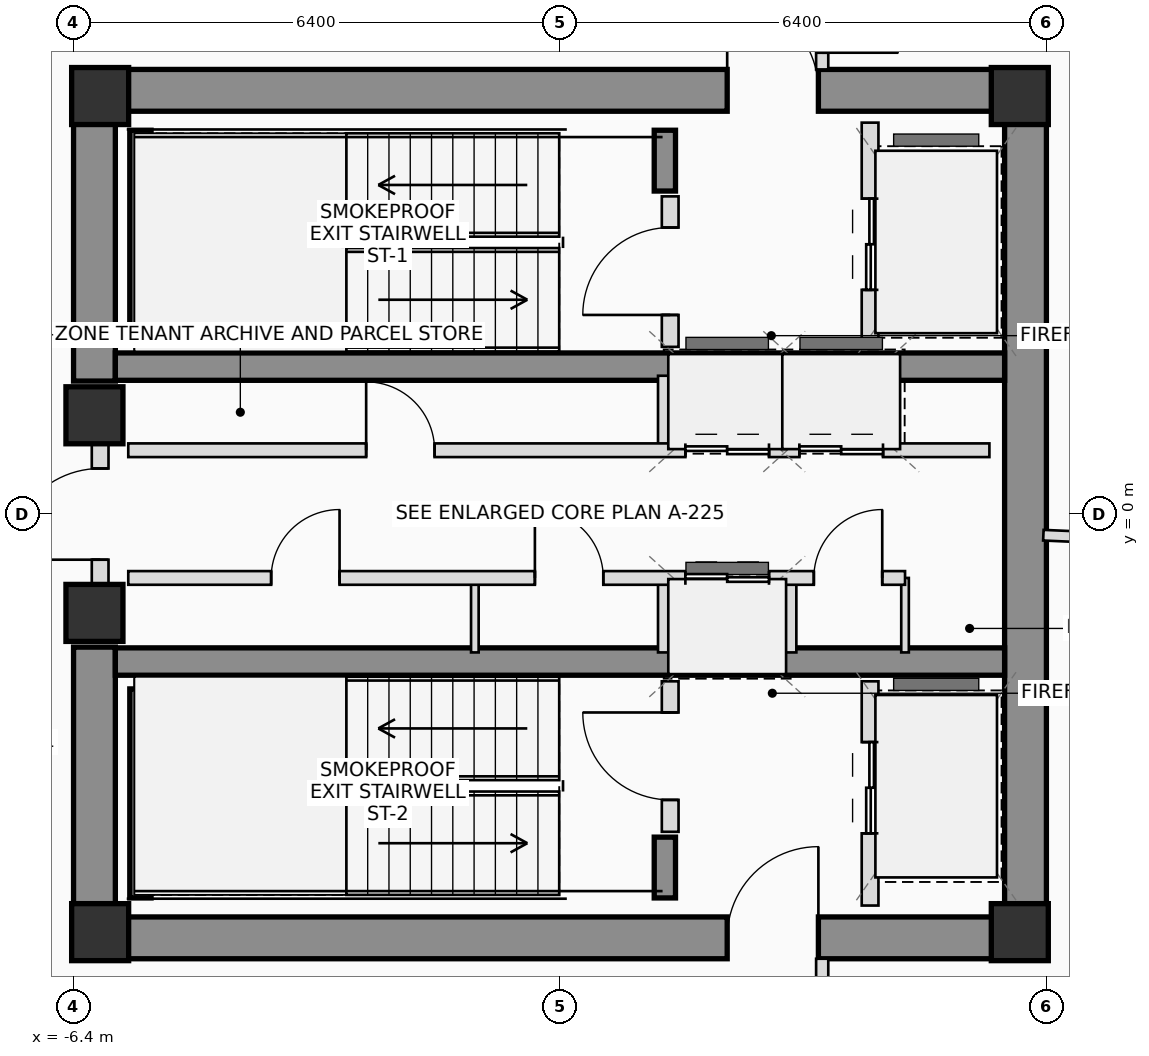
"""IFC4 building model, lengths in metres.
Left out: names, types, materials, properties, quantities, classifications, styles, units other than length and angle.
Written with IfcOpenShell. Run it as: python <this file> out.ifc"""

import sys

from ifc_helpers import new_model, si_unit, direction, frame, frame_2d, origin, origin_2d, place, context, subcontext, project, spatial, rectangle, extrude, source, transform, mapped, element, fill, save


model = new_model("IFC4")
c1 = context("Model", 3, precision=1e-05, world=origin(), true_north=direction((0.0, 1.0)))
c2 = subcontext(c1, "Body", "Model", "MODEL_VIEW")
j1 = project(units=[si_unit("LENGTHUNIT", "METRE"), si_unit("PLANEANGLEUNIT", "RADIAN")], contexts=[c1])
p1 = place(None, origin())
s1 = spatial("IfcSite", under=j1, at=p1, CompositionType="ELEMENT")
p2 = place(p1, origin())
s2 = spatial("IfcBuilding", under=s1, at=p2, CompositionType="ELEMENT")
p3 = place(p2, frame((0.0, 0.0, 271.15)))
s3 = spatial("IfcBuildingStorey", under=s2, at=p3, CompositionType="ELEMENT", Elevation=271.15)
m1 = source(origin(), c2, "Body", "SweptSolid", [
    extrude(rectangle(XDim=0.75, YDim=0.75, at=origin_2d()), origin(), (0.0, 0.0, 1.0), 3.4),
])
for number, where, z_axis, x_axis in (
    (1, (-6.05, -5.5, 0.0), (0.0, 0.0, 1.0), (1.0, 0.0, 0.0)),
    (2, (6.05, -5.5, 0.0), (0.0, 0.0, 1.0), (1.0, 0.0, 0.0)),
    (3, (6.05, 5.5, 0.0), (0.0, 0.0, 1.0), (1.0, 0.0, 0.0)),
    (4, (-6.05, 5.5, 0.0), (0.0, 0.0, 1.0), (1.0, 0.0, 0.0)),
):
    element("IfcColumn", number, at=place(p3, frame(where, z_axis=z_axis, x_axis=x_axis)), inside=s3, PredefinedType="COLUMN", context=c2, shape_type="MappedRepresentation", body=[
        mapped(m1, transform((0.0, 0.0, 0.0), scale=1.0)),
    ])
p4 = place(p3, frame((-6.4, 5.575, 0.0), z_axis=(0.0, 0.0, 1.0), x_axis=(1.0, 0.0, 0.0)))
e5 = element("IfcWall", 5, at=p4, inside=s3, PredefinedType="SHEAR", context=c2, shape_type="SweptSolid", body=[
    extrude(rectangle(XDim=12.8, YDim=0.55, at=frame_2d((6.4, 0.0))), origin(), (0.0, 0.0, 1.0), 3.4),
])
p5 = place(p4, frame((8.6, 0.0, 0.0)))
e6 = element("IfcOpeningElement", 6, at=p5, cuts=e5, PredefinedType="OPENING", context=c2, shape_type="SweptSolid", body=[
    extrude(rectangle(XDim=1.2, YDim=2.2, at=frame_2d((0.6, 1.1))), frame((0.0, 0.285, 0.0), z_axis=(0.0, -1.0, 0.0), x_axis=(1.0, 0.0, 0.0)), (0.0, 0.0, 1.0), 0.57),
])
p6 = place(p3, frame((-6.4, -5.575, 0.0), z_axis=(0.0, 0.0, 1.0), x_axis=(1.0, 0.0, 0.0)))
e7 = element("IfcWall", 7, at=p6, inside=s3, PredefinedType="SHEAR", context=c2, shape_type="SweptSolid", body=[
    extrude(rectangle(XDim=12.8, YDim=0.55, at=frame_2d((6.4, 0.0))), origin(), (0.0, 0.0, 1.0), 3.4),
])
p7 = place(p6, frame((8.6, 0.0, 0.0)))
e8 = element("IfcOpeningElement", 8, at=p7, cuts=e7, PredefinedType="OPENING", context=c2, shape_type="SweptSolid", body=[
    extrude(rectangle(XDim=1.2, YDim=2.2, at=frame_2d((0.6, 1.1))), frame((0.0, 0.285, 0.0), z_axis=(0.0, -1.0, 0.0), x_axis=(1.0, 0.0, 0.0)), (0.0, 0.0, 1.0), 0.57),
])
p8 = place(p3, frame((6.125, -5.3, 0.0), z_axis=(0.0, 0.0, 1.0), x_axis=(0.0, 1.0, 0.0)))
e9 = element("IfcWall", 9, at=p8, inside=s3, PredefinedType="SHEAR", context=c2, shape_type="SweptSolid", body=[
    extrude(rectangle(XDim=10.6, YDim=0.55, at=frame_2d((5.3, 0.0))), origin(), (0.0, 0.0, 1.0), 3.4),
])
for number, where, z_axis, x_axis in (
    (10, (-6.125, -5.3, 0.0), (0.0, 0.0, 1.0), (0.0, 1.0, 0.0)),
    (11, (-6.125, 1.75, 0.0), (0.0, 0.0, 1.0), (0.0, 1.0, 0.0)),
):
    element("IfcWall", number, at=place(p3, frame(where, z_axis=z_axis, x_axis=x_axis)), inside=s3, PredefinedType="SHEAR", context=c2, shape_type="SweptSolid", body=[
        extrude(rectangle(XDim=3.55, YDim=0.55, at=frame_2d((1.775, 0.0))), origin(), (0.0, 0.0, 1.0), 3.4),
    ])
for number, where, z_axis, x_axis in (
    (12, (-5.85, 1.94, 0.0), (0.0, 0.0, 1.0), (1.0, 0.0, 0.0)),
    (13, (-5.85, -1.94, 0.0), (0.0, 0.0, 1.0), (1.0, 0.0, 0.0)),
):
    element("IfcWall", number, at=place(p3, frame(where, z_axis=z_axis, x_axis=x_axis)), inside=s3, PredefinedType="SHEAR", context=c2, shape_type="SweptSolid", body=[
        extrude(rectangle(XDim=11.7, YDim=0.36, at=frame_2d((5.85, 0.0))), origin(), (0.0, 0.0, 1.0), 3.4),
    ])
p9 = place(p3, frame((-5.52, 2.3, 0.0), z_axis=(0.0, 0.0, 1.0), x_axis=(0.0, 1.0, 0.0)))
e14 = element("IfcWall", 14, at=p9, inside=s3, PredefinedType="SHEAR", context=c2, shape_type="SweptSolid", body=[
    extrude(rectangle(XDim=2.75, YDim=0.28, at=frame_2d((1.375, 0.0))), origin(), (0.0, 0.0, 1.0), 3.4),
])
p10 = place(p3, frame((1.38, 4.25, 0.0), z_axis=(0.0, 0.0, 1.0), x_axis=(0.0, 1.0, 0.0)))
e15 = element("IfcWall", 15, at=p10, inside=s3, PredefinedType="SHEAR", context=c2, shape_type="SweptSolid", body=[
    extrude(rectangle(XDim=0.8, YDim=0.28, at=frame_2d((0.4, 0.0))), origin(), (0.0, 0.0, 1.0), 3.4),
])
p11 = place(p3, frame((-5.52, -5.05, 0.0), z_axis=(0.0, 0.0, 1.0), x_axis=(0.0, 1.0, 0.0)))
e16 = element("IfcWall", 16, at=p11, inside=s3, PredefinedType="SHEAR", context=c2, shape_type="SweptSolid", body=[
    extrude(rectangle(XDim=2.75, YDim=0.28, at=frame_2d((1.375, 0.0))), origin(), (0.0, 0.0, 1.0), 3.4),
])
p12 = place(p3, frame((1.38, -5.05, 0.0), z_axis=(0.0, 0.0, 1.0), x_axis=(0.0, 1.0, 0.0)))
e17 = element("IfcWall", 17, at=p12, inside=s3, PredefinedType="SHEAR", context=c2, shape_type="SweptSolid", body=[
    extrude(rectangle(XDim=0.8, YDim=0.28, at=frame_2d((0.4, 0.0))), origin(), (0.0, 0.0, 1.0), 3.4),
])
for number, where, z_axis, x_axis in (
    (18, (-6.125, -1.3, 0.0), (0.0, 0.0, 1.0), (1.0, 0.0, 0.0)),
    (19, (-6.125, 1.3, 0.0), (0.0, 0.0, 1.0), (1.0, 0.0, 0.0)),
):
    element("IfcColumn", number, at=place(p3, frame(where, z_axis=z_axis, x_axis=x_axis)), inside=s3, PredefinedType="COLUMN", context=c2, shape_type="MappedRepresentation", body=[
        mapped(m1, transform((0.0, 0.0, 0.0), scale=1.0)),
    ])
p13 = place(p3, frame((-6.05, -0.95, 0.0), z_axis=(0.0, 0.0, 1.0), x_axis=(0.0, 1.0, 0.0)))
e20 = element("IfcWall", 20, at=p13, inside=s3, PredefinedType="PLUMBINGWALL", context=c2, shape_type="SweptSolid", body=[
    extrude(rectangle(XDim=1.9, YDim=0.22, at=frame_2d((0.95, 0.0))), origin(), (0.0, 0.0, 1.0), 2.18),
])
p14 = place(p13, frame((0.35, 0.0, 0.0)))
e21 = element("IfcOpeningElement", 21, at=p14, cuts=e20, PredefinedType="OPENING", context=c2, shape_type="SweptSolid", body=[
    extrude(rectangle(XDim=1.2, YDim=2.2, at=frame_2d((0.6, 1.1))), frame((0.0, 0.12, 0.0), z_axis=(0.0, -1.0, 0.0), x_axis=(1.0, 0.0, 0.0)), (0.0, 0.0, 1.0), 0.24),
])
p15 = place(p3, frame((1.45, 2.2, 0.0), z_axis=(0.0, 0.0, 1.0), x_axis=(0.0, 1.0, 0.0)))
e22 = element("IfcWall", 22, at=p15, inside=s3, PredefinedType="PLUMBINGWALL", context=c2, shape_type="SweptSolid", body=[
    extrude(rectangle(XDim=1.98, YDim=0.22, at=frame_2d((0.99, 0.0))), origin(), (0.0, 0.0, 1.0), 3.2),
])
p16 = place(p15, frame((0.42, 0.0, 0.0)))
e23 = element("IfcOpeningElement", 23, at=p16, cuts=e22, PredefinedType="OPENING", context=c2, shape_type="SweptSolid", body=[
    extrude(rectangle(XDim=1.15, YDim=2.15, at=frame_2d((0.575, 1.075))), frame((0.0, 0.12, 0.0), z_axis=(0.0, -1.0, 0.0), x_axis=(1.0, 0.0, 0.0)), (0.0, 0.0, 1.0), 0.24),
])
p17 = place(p3, frame((4.08, 2.2, 0.0), z_axis=(0.0, 0.0, 1.0), x_axis=(0.0, 1.0, 0.0)))
e24 = element("IfcWall", 24, at=p17, inside=s3, PredefinedType="PLUMBINGWALL", context=c2, shape_type="SweptSolid", body=[
    extrude(rectangle(XDim=2.95, YDim=0.22, at=frame_2d((1.475, 0.0))), origin(), (0.0, 0.0, 1.0), 3.2),
])
p18 = place(p17, frame((0.75, 0.0, 0.0)))
e25 = element("IfcOpeningElement", 25, at=p18, cuts=e24, PredefinedType="OPENING", context=c2, shape_type="SweptSolid", body=[
    extrude(rectangle(XDim=1.2, YDim=2.25, at=frame_2d((0.6, 1.125))), frame((0.0, 0.12, 0.0), z_axis=(0.0, -1.0, 0.0), x_axis=(1.0, 0.0, 0.0)), (0.0, 0.0, 1.0), 0.24),
])
p19 = place(p3, frame((1.45, -4.18, 0.0), z_axis=(0.0, 0.0, 1.0), x_axis=(0.0, 1.0, 0.0)))
e26 = element("IfcWall", 26, at=p19, inside=s3, PredefinedType="PLUMBINGWALL", context=c2, shape_type="SweptSolid", body=[
    extrude(rectangle(XDim=1.98, YDim=0.22, at=frame_2d((0.99, 0.0))), origin(), (0.0, 0.0, 1.0), 3.2),
])
p20 = place(p19, frame((0.42, 0.0, 0.0)))
e27 = element("IfcOpeningElement", 27, at=p20, cuts=e26, PredefinedType="OPENING", context=c2, shape_type="SweptSolid", body=[
    extrude(rectangle(XDim=1.15, YDim=2.15, at=frame_2d((0.575, 1.075))), frame((0.0, 0.12, 0.0), z_axis=(0.0, -1.0, 0.0), x_axis=(1.0, 0.0, 0.0)), (0.0, 0.0, 1.0), 0.24),
])
p21 = place(p3, frame((4.08, -5.15, 0.0), z_axis=(0.0, 0.0, 1.0), x_axis=(0.0, 1.0, 0.0)))
e28 = element("IfcWall", 28, at=p21, inside=s3, PredefinedType="PLUMBINGWALL", context=c2, shape_type="SweptSolid", body=[
    extrude(rectangle(XDim=2.95, YDim=0.22, at=frame_2d((1.475, 0.0))), origin(), (0.0, 0.0, 1.0), 3.2),
])
p22 = place(p21, frame((0.95, 0.0, 0.0)))
e29 = element("IfcOpeningElement", 29, at=p22, cuts=e28, PredefinedType="OPENING", context=c2, shape_type="SweptSolid", body=[
    extrude(rectangle(XDim=1.2, YDim=2.25, at=frame_2d((0.6, 1.125))), frame((0.0, 0.12, 0.0), z_axis=(0.0, -1.0, 0.0), x_axis=(1.0, 0.0, 0.0)), (0.0, 0.0, 1.0), 0.24),
])
p23 = place(p3, frame((-1.12, -1.82, 0.0), z_axis=(0.0, 0.0, 1.0), x_axis=(0.0, 1.0, 0.0)))
e30 = element("IfcWall", 30, at=p23, inside=s3, PredefinedType="PARTITIONING", context=c2, shape_type="SweptSolid", body=[
    extrude(rectangle(XDim=0.98, YDim=0.1, at=frame_2d((0.49, 0.0))), origin(), (0.0, 0.0, 1.0), 3.2),
])
for number, where, z_axis, x_axis in (
    (31, (1.38, 0.84, 0.0), (0.0, 0.0, 1.0), (0.0, 1.0, 0.0)),
    (32, (1.38, -1.82, 0.0), (0.0, 0.0, 1.0), (0.0, 1.0, 0.0)),
    (33, (3.02, 0.84, 0.0), (0.0, 0.0, 1.0), (0.0, 1.0, 0.0)),
    (34, (4.38, 0.84, 0.0), (0.0, 0.0, 1.0), (0.0, 1.0, 0.0)),
    (35, (3.02, -1.82, 0.0), (0.0, 0.0, 1.0), (0.0, 1.0, 0.0)),
):
    element("IfcWall", number, at=place(p3, frame(where, z_axis=z_axis, x_axis=x_axis)), inside=s3, PredefinedType="PLUMBINGWALL", context=c2, shape_type="SweptSolid", body=[
        extrude(rectangle(XDim=0.98, YDim=0.18, at=frame_2d((0.49, 0.0))), origin(), (0.0, 0.0, 1.0), 3.2),
    ])
p24 = place(p3, frame((4.54, -1.82, 0.0), z_axis=(0.0, 0.0, 1.0), x_axis=(0.0, 1.0, 0.0)))
e36 = element("IfcWall", 36, at=p24, inside=s3, PredefinedType="PARTITIONING", context=c2, shape_type="SweptSolid", body=[
    extrude(rectangle(XDim=0.98, YDim=0.1, at=frame_2d((0.49, 0.0))), origin(), (0.0, 0.0, 1.0), 3.2),
])
p25 = place(p3, frame((-5.68, 0.84, 0.0), z_axis=(0.0, 0.0, 1.0), x_axis=(1.0, 0.0, 0.0)))
e37 = element("IfcWall", 37, at=p25, inside=s3, PredefinedType="PLUMBINGWALL", context=c2, shape_type="SweptSolid", body=[
    extrude(rectangle(XDim=11.33, YDim=0.18, at=frame_2d((5.665, 0.0))), origin(), (0.0, 0.0, 1.0), 3.2),
])
p26 = place(p25, frame((3.13, 0.0, 0.0)))
e38 = element("IfcOpeningElement", 38, at=p26, cuts=e37, PredefinedType="OPENING", context=c2, shape_type="SweptSolid", body=[
    extrude(rectangle(XDim=0.9, YDim=2.05, at=frame_2d((0.45, 1.025))), frame((0.0, 0.1, 0.0), z_axis=(0.0, -1.0, 0.0), x_axis=(1.0, 0.0, 0.0)), (0.0, 0.0, 1.0), 0.2),
])
p27 = place(p25, frame((7.33, 0.0, 0.0)))
e39 = element("IfcOpeningElement", 39, at=p27, cuts=e37, PredefinedType="OPENING", context=c2, shape_type="SweptSolid", body=[
    extrude(rectangle(XDim=1.1, YDim=2.2, at=frame_2d((0.55, 1.1))), frame((0.0, 0.1, 0.0), z_axis=(0.0, -1.0, 0.0), x_axis=(1.0, 0.0, 0.0)), (0.0, 0.0, 1.0), 0.2),
])
p28 = place(p25, frame((8.83, 0.0, 0.0)))
e40 = element("IfcOpeningElement", 40, at=p28, cuts=e37, PredefinedType="OPENING", context=c2, shape_type="SweptSolid", body=[
    extrude(rectangle(XDim=1.1, YDim=2.2, at=frame_2d((0.55, 1.1))), frame((0.0, 0.1, 0.0), z_axis=(0.0, -1.0, 0.0), x_axis=(1.0, 0.0, 0.0)), (0.0, 0.0, 1.0), 0.2),
])
p29 = place(p3, frame((-5.68, -0.84, 0.0), z_axis=(0.0, 0.0, 1.0), x_axis=(1.0, 0.0, 0.0)))
e41 = element("IfcWall", 41, at=p29, inside=s3, PredefinedType="PLUMBINGWALL", context=c2, shape_type="SweptSolid", body=[
    extrude(rectangle(XDim=10.22, YDim=0.18, at=frame_2d((5.11, 0.0))), origin(), (0.0, 0.0, 1.0), 3.2),
])
p30 = place(p29, frame((1.88, 0.0, 0.0)))
e42 = element("IfcOpeningElement", 42, at=p30, cuts=e41, PredefinedType="OPENING", context=c2, shape_type="SweptSolid", body=[
    extrude(rectangle(XDim=0.9, YDim=2.05, at=frame_2d((0.45, 1.025))), frame((0.0, 0.1, 0.0), z_axis=(0.0, -1.0, 0.0), x_axis=(1.0, 0.0, 0.0)), (0.0, 0.0, 1.0), 0.2),
])
p31 = place(p29, frame((5.35, 0.0, 0.0)))
e43 = element("IfcOpeningElement", 43, at=p31, cuts=e41, PredefinedType="OPENING", context=c2, shape_type="SweptSolid", body=[
    extrude(rectangle(XDim=0.9, YDim=2.05, at=frame_2d((0.45, 1.025))), frame((0.0, 0.1, 0.0), z_axis=(0.0, -1.0, 0.0), x_axis=(1.0, 0.0, 0.0)), (0.0, 0.0, 1.0), 0.2),
])
p32 = place(p29, frame((7.33, 0.0, 0.0)))
e44 = element("IfcOpeningElement", 44, at=p32, cuts=e41, PredefinedType="OPENING", context=c2, shape_type="SweptSolid", body=[
    extrude(rectangle(XDim=1.1, YDim=2.2, at=frame_2d((0.55, 1.1))), frame((0.0, 0.1, 0.0), z_axis=(0.0, -1.0, 0.0), x_axis=(1.0, 0.0, 0.0)), (0.0, 0.0, 1.0), 0.2),
])
p33 = place(p29, frame((9.02, 0.0, 0.0)))
e45 = element("IfcOpeningElement", 45, at=p33, cuts=e41, PredefinedType="OPENING", context=c2, shape_type="SweptSolid", body=[
    extrude(rectangle(XDim=0.9, YDim=2.05, at=frame_2d((0.45, 1.025))), frame((0.0, 0.1, 0.0), z_axis=(0.0, -1.0, 0.0), x_axis=(1.0, 0.0, 0.0)), (0.0, 0.0, 1.0), 0.2),
])
p34 = place(p3, frame((3.45, 7.49, 0.0), z_axis=(0.0, 0.0, 1.0), x_axis=(0.0, -1.0, 0.0)))
e46 = element("IfcWall", 46, at=p34, inside=s3, PredefinedType="PARTITIONING", context=c2, shape_type="SweptSolid", body=[
    extrude(rectangle(XDim=1.64, YDim=0.16, at=frame_2d((0.82, 0.0))), origin(), (0.0, 0.0, 1.0), 2.805),
])
p35 = place(p34, frame((0.42, 0.0, 0.0)))
e47 = element("IfcOpeningElement", 47, at=p35, cuts=e46, PredefinedType="OPENING", context=c2, shape_type="SweptSolid", body=[
    extrude(rectangle(XDim=1.0, YDim=2.25, at=frame_2d((0.5, 1.125))), frame((0.0, 0.09, 0.0), z_axis=(0.0, -1.0, 0.0), x_axis=(1.0, 0.0, 0.0)), (0.0, 0.0, 1.0), 0.18),
])
p36 = place(p3, frame((3.45, -5.85, 0.0), z_axis=(0.0, 0.0, 1.0), x_axis=(0.0, -1.0, 0.0)))
e48 = element("IfcWall", 48, at=p36, inside=s3, PredefinedType="PARTITIONING", context=c2, shape_type="SweptSolid", body=[
    extrude(rectangle(XDim=1.64, YDim=0.16, at=frame_2d((0.82, 0.0))), origin(), (0.0, 0.0, 1.0), 3.2),
])
p37 = place(p36, frame((0.32, 0.0, 0.0)))
e49 = element("IfcOpeningElement", 49, at=p37, cuts=e48, PredefinedType="OPENING", context=c2, shape_type="SweptSolid", body=[
    extrude(rectangle(XDim=1.0, YDim=2.25, at=frame_2d((0.5, 1.125))), frame((0.0, 0.09, 0.0), z_axis=(0.0, -1.0, 0.0), x_axis=(1.0, 0.0, 0.0)), (0.0, 0.0, 1.0), 0.18),
])
p38 = place(p3, frame((6.36, -0.278, 0.0), z_axis=(0.0, 0.0, 1.0), x_axis=(0.999047788643, -0.043629302162, 0.0)))
e50 = element("IfcWall", 50, at=p38, inside=s3, PredefinedType="PARTITIONING", context=c2, shape_type="SweptSolid", body=[
    extrude(rectangle(XDim=11.197, YDim=0.14, at=frame_2d((5.599, 0.0))), origin(), (0.0, 0.0, 1.0), 2.765),
])
p39 = place(p5, origin())
e51 = element("IfcDoor", 51, at=p39, inside=s3, OperationType="SINGLE_SWING_LEFT", PredefinedType="DOOR", context=c2, shape_type="SweptSolid", body=[
    extrude(rectangle(XDim=1.2, YDim=2.2, at=frame_2d((0.6, 1.1))), frame((0.0, 0.025, 0.0), z_axis=(0.0, -1.0, 0.0), x_axis=(1.0, 0.0, 0.0)), (0.0, 0.0, 1.0), 0.05),
])
fill(e6, e51)
p40 = place(p7, origin())
e52 = element("IfcDoor", 52, at=p40, inside=s3, OperationType="SINGLE_SWING_RIGHT", PredefinedType="DOOR", context=c2, shape_type="SweptSolid", body=[
    extrude(rectangle(XDim=1.2, YDim=2.2, at=frame_2d((0.6, 1.1))), frame((0.0, 0.025, 0.0), z_axis=(0.0, -1.0, 0.0), x_axis=(1.0, 0.0, 0.0)), (0.0, 0.0, 1.0), 0.05),
])
fill(e8, e52)
p41 = place(p14, origin())
e53 = element("IfcDoor", 53, at=p41, inside=s3, OperationType="SINGLE_SWING_LEFT", PredefinedType="DOOR", context=c2, shape_type="SweptSolid", body=[
    extrude(rectangle(XDim=1.2, YDim=2.2, at=frame_2d((0.6, 1.1))), frame((0.0, 0.025, 0.0), z_axis=(0.0, -1.0, 0.0), x_axis=(1.0, 0.0, 0.0)), (0.0, 0.0, 1.0), 0.05),
])
fill(e21, e53)
p42 = place(p16, origin())
e54 = element("IfcDoor", 54, at=p42, inside=s3, OperationType="SINGLE_SWING_LEFT", PredefinedType="DOOR", context=c2, shape_type="SweptSolid", body=[
    extrude(rectangle(XDim=1.15, YDim=2.15, at=frame_2d((0.575, 1.075))), frame((0.0, 0.025, 0.0), z_axis=(0.0, -1.0, 0.0), x_axis=(1.0, 0.0, 0.0)), (0.0, 0.0, 1.0), 0.05),
])
fill(e23, e54)
p43 = place(p18, origin())
e55 = element("IfcDoor", 55, at=p43, inside=s3, OperationType="DOUBLE_DOOR_SLIDING", PredefinedType="DOOR", context=c2, shape_type="SweptSolid", body=[
    extrude(rectangle(XDim=1.2, YDim=2.25, at=frame_2d((0.6, 1.125))), frame((0.0, 0.025, 0.0), z_axis=(0.0, -1.0, 0.0), x_axis=(1.0, 0.0, 0.0)), (0.0, 0.0, 1.0), 0.05),
])
fill(e25, e55)
p44 = place(p20, origin())
e56 = element("IfcDoor", 56, at=p44, inside=s3, OperationType="SINGLE_SWING_RIGHT", PredefinedType="DOOR", context=c2, shape_type="SweptSolid", body=[
    extrude(rectangle(XDim=1.15, YDim=2.15, at=frame_2d((0.575, 1.075))), frame((0.0, 0.025, 0.0), z_axis=(0.0, -1.0, 0.0), x_axis=(1.0, 0.0, 0.0)), (0.0, 0.0, 1.0), 0.05),
])
fill(e27, e56)
p45 = place(p22, origin())
e57 = element("IfcDoor", 57, at=p45, inside=s3, OperationType="DOUBLE_DOOR_SLIDING", PredefinedType="DOOR", context=c2, shape_type="SweptSolid", body=[
    extrude(rectangle(XDim=1.2, YDim=2.25, at=frame_2d((0.6, 1.125))), frame((0.0, 0.025, 0.0), z_axis=(0.0, -1.0, 0.0), x_axis=(1.0, 0.0, 0.0)), (0.0, 0.0, 1.0), 0.05),
])
fill(e29, e57)
p46 = place(p26, origin())
e58 = element("IfcDoor", 58, at=p46, inside=s3, OperationType="SINGLE_SWING_LEFT", PredefinedType="DOOR", context=c2, shape_type="SweptSolid", body=[
    extrude(rectangle(XDim=0.9, YDim=2.05, at=frame_2d((0.45, 1.025))), frame((0.0, 0.025, 0.0), z_axis=(0.0, -1.0, 0.0), x_axis=(1.0, 0.0, 0.0)), (0.0, 0.0, 1.0), 0.05),
])
fill(e38, e58)
p47 = place(p27, origin())
e59 = element("IfcDoor", 59, at=p47, inside=s3, OperationType="DOUBLE_DOOR_SLIDING", PredefinedType="DOOR", context=c2, shape_type="SweptSolid", body=[
    extrude(rectangle(XDim=1.1, YDim=2.2, at=frame_2d((0.55, 1.1))), frame((0.0, 0.025, 0.0), z_axis=(0.0, -1.0, 0.0), x_axis=(1.0, 0.0, 0.0)), (0.0, 0.0, 1.0), 0.05),
])
fill(e39, e59)
p48 = place(p28, origin())
e60 = element("IfcDoor", 60, at=p48, inside=s3, OperationType="DOUBLE_DOOR_SLIDING", PredefinedType="DOOR", context=c2, shape_type="SweptSolid", body=[
    extrude(rectangle(XDim=1.1, YDim=2.2, at=frame_2d((0.55, 1.1))), frame((0.0, 0.025, 0.0), z_axis=(0.0, -1.0, 0.0), x_axis=(1.0, 0.0, 0.0)), (0.0, 0.0, 1.0), 0.05),
])
fill(e40, e60)
p49 = place(p30, origin())
e61 = element("IfcDoor", 61, at=p49, inside=s3, OperationType="SINGLE_SWING_RIGHT", PredefinedType="DOOR", context=c2, shape_type="SweptSolid", body=[
    extrude(rectangle(XDim=0.9, YDim=2.05, at=frame_2d((0.45, 1.025))), frame((0.0, 0.025, 0.0), z_axis=(0.0, -1.0, 0.0), x_axis=(1.0, 0.0, 0.0)), (0.0, 0.0, 1.0), 0.05),
])
fill(e42, e61)
p50 = place(p31, origin())
e62 = element("IfcDoor", 62, at=p50, inside=s3, OperationType="SINGLE_SWING_LEFT", PredefinedType="DOOR", context=c2, shape_type="SweptSolid", body=[
    extrude(rectangle(XDim=0.9, YDim=2.05, at=frame_2d((0.45, 1.025))), frame((0.0, 0.025, 0.0), z_axis=(0.0, -1.0, 0.0), x_axis=(1.0, 0.0, 0.0)), (0.0, 0.0, 1.0), 0.05),
])
fill(e43, e62)
p51 = place(p32, origin())
e63 = element("IfcDoor", 63, at=p51, inside=s3, OperationType="DOUBLE_DOOR_SLIDING", PredefinedType="DOOR", context=c2, shape_type="SweptSolid", body=[
    extrude(rectangle(XDim=1.1, YDim=2.2, at=frame_2d((0.55, 1.1))), frame((0.0, 0.025, 0.0), z_axis=(0.0, -1.0, 0.0), x_axis=(1.0, 0.0, 0.0)), (0.0, 0.0, 1.0), 0.05),
])
fill(e44, e63)
p52 = place(p33, origin())
e64 = element("IfcDoor", 64, at=p52, inside=s3, OperationType="SINGLE_SWING_RIGHT", PredefinedType="DOOR", context=c2, shape_type="SweptSolid", body=[
    extrude(rectangle(XDim=0.9, YDim=2.05, at=frame_2d((0.45, 1.025))), frame((0.0, 0.025, 0.0), z_axis=(0.0, -1.0, 0.0), x_axis=(1.0, 0.0, 0.0)), (0.0, 0.0, 1.0), 0.05),
])
fill(e45, e64)
p53 = place(p35, origin())
e65 = element("IfcDoor", 65, at=p53, inside=s3, OperationType="SINGLE_SWING_RIGHT", PredefinedType="DOOR", context=c2, shape_type="SweptSolid", body=[
    extrude(rectangle(XDim=1.0, YDim=2.25, at=frame_2d((0.5, 1.125))), frame((0.0, 0.025, 0.0), z_axis=(0.0, -1.0, 0.0), x_axis=(1.0, 0.0, 0.0)), (0.0, 0.0, 1.0), 0.05),
])
fill(e47, e65)
save(model, sys.argv[1])
